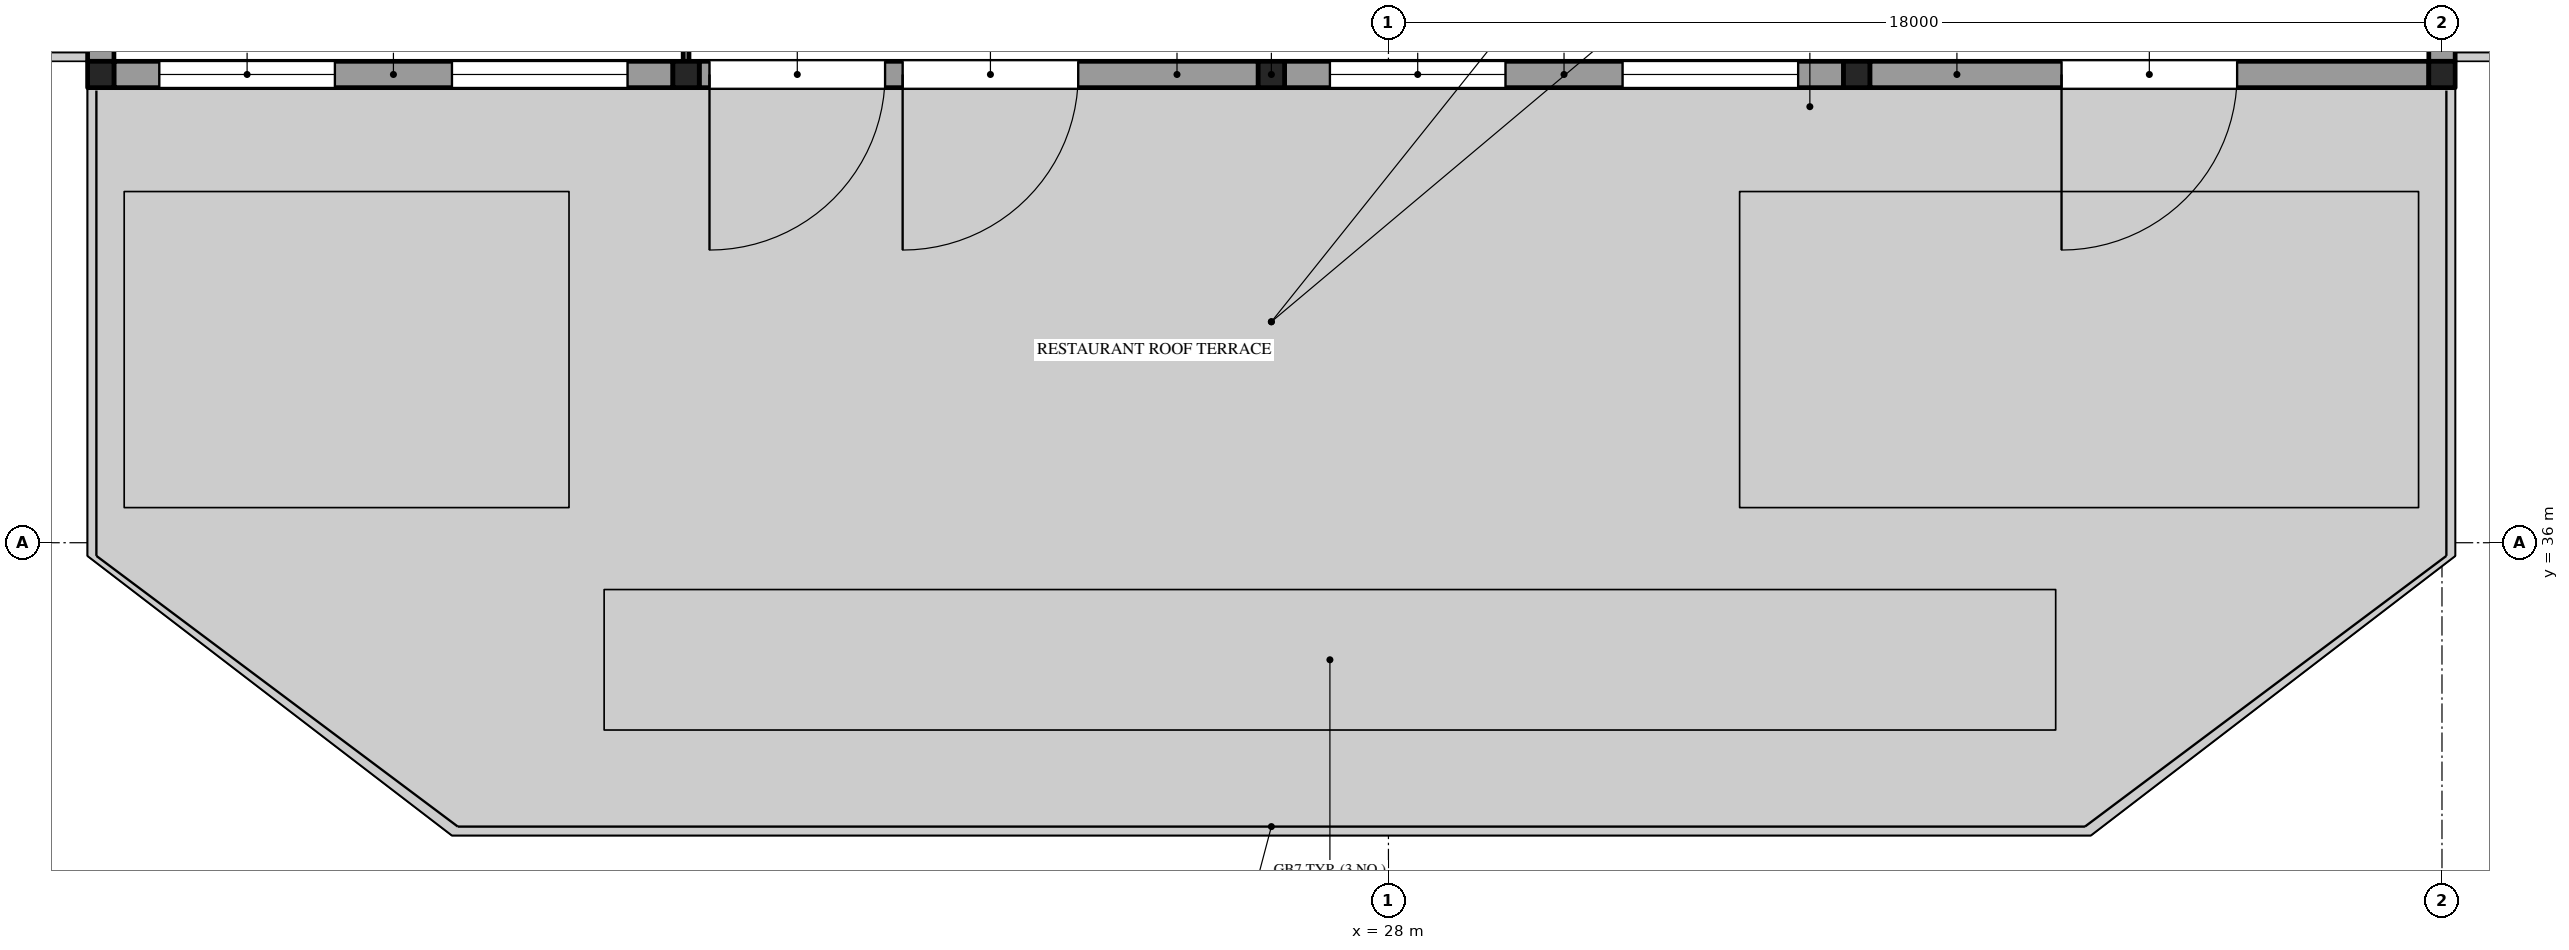
"""IFC4 building model, lengths in metres.
Left out: names, types, materials, properties, quantities, classifications, styles, units other than length and angle.
Written with IfcOpenShell. Run it as: python <this file> out.ifc"""

import sys

from ifc_helpers import new_model, si_unit, direction, frame, frame_2d, origin, origin_2d, place, context, subcontext, project, spatial, rectangle, extrude, element, fill, save


model = new_model("IFC4")
c1 = context("Model", 3, precision=1e-05, world=origin(), true_north=direction((0.0, 1.0)))
c2 = subcontext(c1, "Body", "Model", "MODEL_VIEW")
j1 = project(units=[si_unit("LENGTHUNIT", "METRE"), si_unit("PLANEANGLEUNIT", "RADIAN")], contexts=[c1])
p1 = place(None, origin())
s1 = spatial("IfcSite", under=j1, at=p1, CompositionType="ELEMENT")
p2 = place(p1, origin())
s2 = spatial("IfcBuilding", under=s1, at=p2, CompositionType="ELEMENT")
p3 = place(p2, frame((0.0, 0.0, 12.0)))
s3 = spatial("IfcBuildingStorey", under=s2, at=p3, CompositionType="ELEMENT", Elevation=12.0)
for number, where, z_axis, x_axis in (
    (1, (6.0, 44.0, 0.0), (0.0, 0.0, 1.0), (1.0, 0.0, 0.0)),
    (2, (16.0, 44.0, 0.0), (0.0, 0.0, 1.0), (1.0, 0.0, 0.0)),
    (3, (26.0, 44.0, 0.0), (0.0, 0.0, 1.0), (1.0, 0.0, 0.0)),
    (4, (36.0, 44.0, 0.0), (0.0, 0.0, 1.0), (1.0, 0.0, 0.0)),
    (5, (46.0, 44.0, 0.0), (0.0, 0.0, 1.0), (1.0, 0.0, 0.0)),
):
    element("IfcColumn", number, at=place(p3, frame(where, z_axis=z_axis, x_axis=x_axis)), inside=s3, PredefinedType="COLUMN", context=c2, shape_type="SweptSolid", body=[
        extrude(rectangle(XDim=0.45, YDim=0.45, at=origin_2d()), origin(), (0.0, 0.0, 1.0), 4.8),
    ])
p4 = place(p3, frame((6.225, 44.0, 0.0), z_axis=(0.0, 0.0, 1.0), x_axis=(1.0, 0.0, 0.0)))
e6 = element("IfcWall", 6, at=p4, inside=s3, PredefinedType="SOLIDWALL", context=c2, shape_type="SweptSolid", body=[
    extrude(rectangle(XDim=9.55, YDim=0.45, at=frame_2d((4.775, 0.0))), origin(), (0.0, 0.0, 1.0), 4.45),
])
p5 = place(p4, frame((0.775, 0.0, 0.6)))
e7 = element("IfcOpeningElement", 7, at=p5, cuts=e6, PredefinedType="OPENING", context=c2, shape_type="SweptSolid", body=[
    extrude(rectangle(XDim=3.0, YDim=3.2, at=frame_2d((1.5, 1.6))), frame((0.0, 0.235, 0.0), z_axis=(0.0, -1.0, 0.0), x_axis=(1.0, 0.0, 0.0)), (0.0, 0.0, 1.0), 0.47),
])
p6 = place(p4, frame((5.775, 0.0, 0.6)))
e8 = element("IfcOpeningElement", 8, at=p6, cuts=e6, PredefinedType="OPENING", context=c2, shape_type="SweptSolid", body=[
    extrude(rectangle(XDim=3.0, YDim=3.2, at=frame_2d((1.5, 1.6))), frame((0.0, 0.235, 0.0), z_axis=(0.0, -1.0, 0.0), x_axis=(1.0, 0.0, 0.0)), (0.0, 0.0, 1.0), 0.47),
])
p7 = place(p3, frame((16.225, 44.0, 0.0), z_axis=(0.0, 0.0, 1.0), x_axis=(1.0, 0.0, 0.0)))
e9 = element("IfcWall", 9, at=p7, inside=s3, PredefinedType="SOLIDWALL", context=c2, shape_type="SweptSolid", body=[
    extrude(rectangle(XDim=9.55, YDim=0.45, at=frame_2d((4.775, 0.0))), origin(), (0.0, 0.0, 1.0), 4.45),
])
p8 = place(p7, frame((0.175, 0.0, 0.0)))
e10 = element("IfcOpeningElement", 10, at=p8, cuts=e9, PredefinedType="OPENING", context=c2, shape_type="SweptSolid", body=[
    extrude(rectangle(XDim=3.0, YDim=2.4, at=frame_2d((1.5, 1.2))), frame((0.0, 0.235, 0.0), z_axis=(0.0, -1.0, 0.0), x_axis=(1.0, 0.0, 0.0)), (0.0, 0.0, 1.0), 0.47),
])
p9 = place(p7, frame((3.475, 0.0, 0.0)))
e11 = element("IfcOpeningElement", 11, at=p9, cuts=e9, PredefinedType="OPENING", context=c2, shape_type="SweptSolid", body=[
    extrude(rectangle(XDim=3.0, YDim=2.4, at=frame_2d((1.5, 1.2))), frame((0.0, 0.235, 0.0), z_axis=(0.0, -1.0, 0.0), x_axis=(1.0, 0.0, 0.0)), (0.0, 0.0, 1.0), 0.47),
])
p10 = place(p3, frame((26.225, 44.0, 0.0), z_axis=(0.0, 0.0, 1.0), x_axis=(1.0, 0.0, 0.0)))
e12 = element("IfcWall", 12, at=p10, inside=s3, PredefinedType="SOLIDWALL", context=c2, shape_type="SweptSolid", body=[
    extrude(rectangle(XDim=9.55, YDim=0.45, at=frame_2d((4.775, 0.0))), origin(), (0.0, 0.0, 1.0), 4.45),
])
p11 = place(p10, frame((0.775, 0.0, 0.6)))
e13 = element("IfcOpeningElement", 13, at=p11, cuts=e12, PredefinedType="OPENING", context=c2, shape_type="SweptSolid", body=[
    extrude(rectangle(XDim=3.0, YDim=3.2, at=frame_2d((1.5, 1.6))), frame((0.0, 0.235, 0.0), z_axis=(0.0, -1.0, 0.0), x_axis=(1.0, 0.0, 0.0)), (0.0, 0.0, 1.0), 0.47),
])
p12 = place(p10, frame((5.775, 0.0, 0.6)))
e14 = element("IfcOpeningElement", 14, at=p12, cuts=e12, PredefinedType="OPENING", context=c2, shape_type="SweptSolid", body=[
    extrude(rectangle(XDim=3.0, YDim=3.2, at=frame_2d((1.5, 1.6))), frame((0.0, 0.235, 0.0), z_axis=(0.0, -1.0, 0.0), x_axis=(1.0, 0.0, 0.0)), (0.0, 0.0, 1.0), 0.47),
])
p13 = place(p3, frame((36.225, 44.0, 0.0), z_axis=(0.0, 0.0, 1.0), x_axis=(1.0, 0.0, 0.0)))
e15 = element("IfcWall", 15, at=p13, inside=s3, PredefinedType="SOLIDWALL", context=c2, shape_type="SweptSolid", body=[
    extrude(rectangle(XDim=9.55, YDim=0.45, at=frame_2d((4.775, 0.0))), origin(), (0.0, 0.0, 1.0), 4.45),
])
p14 = place(p13, frame((3.275, 0.0, 0.0)))
e16 = element("IfcOpeningElement", 16, at=p14, cuts=e15, PredefinedType="OPENING", context=c2, shape_type="SweptSolid", body=[
    extrude(rectangle(XDim=3.0, YDim=2.4, at=frame_2d((1.5, 1.2))), frame((0.0, 0.235, 0.0), z_axis=(0.0, -1.0, 0.0), x_axis=(1.0, 0.0, 0.0)), (0.0, 0.0, 1.0), 0.47),
])
p15 = place(p3, frame((6.0, 51.775, 0.0), z_axis=(0.0, 0.0, 1.0), x_axis=(0.0, -1.0, 0.0)))
e17 = element("IfcWall", 17, at=p15, inside=s3, PredefinedType="SOLIDWALL", context=c2, shape_type="SweptSolid", body=[
    extrude(rectangle(XDim=7.55, YDim=0.45, at=frame_2d((3.775, 0.0))), origin(), (0.0, 0.0, 1.0), 4.45),
])
p16 = place(p15, frame((4.275, 0.0, 0.6)))
e18 = element("IfcOpeningElement", 18, at=p16, cuts=e17, PredefinedType="OPENING", context=c2, shape_type="SweptSolid", body=[
    extrude(rectangle(XDim=3.0, YDim=3.2, at=frame_2d((1.5, 1.6))), frame((0.0, 0.235, 0.0), z_axis=(0.0, -1.0, 0.0), x_axis=(1.0, 0.0, 0.0)), (0.0, 0.0, 1.0), 0.47),
])
p17 = place(p15, frame((0.275, 0.0, 0.6)))
e19 = element("IfcOpeningElement", 19, at=p17, cuts=e17, PredefinedType="OPENING", context=c2, shape_type="SweptSolid", body=[
    extrude(rectangle(XDim=3.0, YDim=3.2, at=frame_2d((1.5, 1.6))), frame((0.0, 0.235, 0.0), z_axis=(0.0, -1.0, 0.0), x_axis=(1.0, 0.0, 0.0)), (0.0, 0.0, 1.0), 0.47),
])
p18 = place(p3, frame((16.0, 44.225, 0.0), z_axis=(0.0, 0.0, 1.0), x_axis=(0.0, 1.0, 0.0)))
e20 = element("IfcWall", 20, at=p18, inside=s3, PredefinedType="PARTITIONING", context=c2, shape_type="SweptSolid", body=[
    extrude(rectangle(XDim=7.525, YDim=0.1, at=frame_2d((3.762, 0.0))), origin(), (0.0, 0.0, 1.0), 4.45),
])
p19 = place(p18, frame((3.175, 0.0, 0.0)))
e21 = element("IfcOpeningElement", 21, at=p19, cuts=e20, PredefinedType="OPENING", context=c2, shape_type="SweptSolid", body=[
    extrude(rectangle(XDim=1.2, YDim=2.1, at=frame_2d((0.6, 1.05))), frame((0.0, 0.06, 0.0), z_axis=(0.0, -1.0, 0.0), x_axis=(1.0, 0.0, 0.0)), (0.0, 0.0, 1.0), 0.12),
])
p20 = place(p3, frame((46.0, 44.225, 0.0), z_axis=(0.0, 0.0, 1.0), x_axis=(0.0, 1.0, 0.0)))
e22 = element("IfcWall", 22, at=p20, inside=s3, PredefinedType="SOLIDWALL", context=c2, shape_type="SweptSolid", body=[
    extrude(rectangle(XDim=7.55, YDim=0.45, at=frame_2d((3.775, 0.0))), origin(), (0.0, 0.0, 1.0), 4.45),
])
p21 = place(p20, frame((0.275, 0.0, 0.6)))
e23 = element("IfcOpeningElement", 23, at=p21, cuts=e22, PredefinedType="OPENING", context=c2, shape_type="SweptSolid", body=[
    extrude(rectangle(XDim=3.0, YDim=3.2, at=frame_2d((1.5, 1.6))), frame((0.0, 0.235, 0.0), z_axis=(0.0, -1.0, 0.0), x_axis=(1.0, 0.0, 0.0)), (0.0, 0.0, 1.0), 0.47),
])
p22 = place(p20, frame((4.275, 0.0, 0.6)))
e24 = element("IfcOpeningElement", 24, at=p22, cuts=e22, PredefinedType="OPENING", context=c2, shape_type="SweptSolid", body=[
    extrude(rectangle(XDim=3.0, YDim=3.2, at=frame_2d((1.5, 1.6))), frame((0.0, 0.235, 0.0), z_axis=(0.0, -1.0, 0.0), x_axis=(1.0, 0.0, 0.0)), (0.0, 0.0, 1.0), 0.47),
])
p23 = place(p8, frame((3.0, 0.0, 0.0), z_axis=(0.0, 0.0, 1.0), x_axis=(-1.0, 0.0, 0.0)))
e25 = element("IfcDoor", 25, at=p23, inside=s3, OperationType="DOUBLE_DOOR_SINGLE_SWING", PredefinedType="DOOR", context=c2, shape_type="SweptSolid", body=[
    extrude(rectangle(XDim=3.0, YDim=2.4, at=frame_2d((1.5, 1.2))), frame((0.0, 0.025, 0.0), z_axis=(0.0, -1.0, 0.0), x_axis=(1.0, 0.0, 0.0)), (0.0, 0.0, 1.0), 0.05),
])
fill(e10, e25)
p24 = place(p9, frame((3.0, 0.0, 0.0), z_axis=(0.0, 0.0, 1.0), x_axis=(-1.0, 0.0, 0.0)))
e26 = element("IfcDoor", 26, at=p24, inside=s3, OperationType="DOUBLE_DOOR_SINGLE_SWING", PredefinedType="DOOR", context=c2, shape_type="SweptSolid", body=[
    extrude(rectangle(XDim=3.0, YDim=2.4, at=frame_2d((1.5, 1.2))), frame((0.0, 0.025, 0.0), z_axis=(0.0, -1.0, 0.0), x_axis=(1.0, 0.0, 0.0)), (0.0, 0.0, 1.0), 0.05),
])
fill(e11, e26)
p25 = place(p14, frame((3.0, 0.0, 0.0), z_axis=(0.0, 0.0, 1.0), x_axis=(-1.0, 0.0, 0.0)))
e27 = element("IfcDoor", 27, at=p25, inside=s3, OperationType="DOUBLE_DOOR_SINGLE_SWING", PredefinedType="DOOR", context=c2, shape_type="SweptSolid", body=[
    extrude(rectangle(XDim=3.0, YDim=2.4, at=frame_2d((1.5, 1.2))), frame((0.0, 0.025, 0.0), z_axis=(0.0, -1.0, 0.0), x_axis=(1.0, 0.0, 0.0)), (0.0, 0.0, 1.0), 0.05),
])
fill(e16, e27)
p26 = place(p5, origin())
e28 = element("IfcWindow", 28, at=p26, inside=s3, PartitioningType="SINGLE_PANEL", PredefinedType="WINDOW", context=c2, shape_type="SweptSolid", body=[
    extrude(rectangle(XDim=3.0, YDim=3.2, at=frame_2d((1.5, 1.6))), frame((0.0, 0.215, 0.0), z_axis=(0.0, -1.0, 0.0), x_axis=(1.0, 0.0, 0.0)), (0.0, 0.0, 1.0), 0.06),
])
fill(e7, e28)
p27 = place(p6, origin())
e29 = element("IfcWindow", 29, at=p27, inside=s3, PartitioningType="SINGLE_PANEL", PredefinedType="WINDOW", context=c2, shape_type="SweptSolid", body=[
    extrude(rectangle(XDim=3.0, YDim=3.2, at=frame_2d((1.5, 1.6))), frame((0.0, 0.215, 0.0), z_axis=(0.0, -1.0, 0.0), x_axis=(1.0, 0.0, 0.0)), (0.0, 0.0, 1.0), 0.06),
])
fill(e8, e29)
p28 = place(p11, origin())
e30 = element("IfcWindow", 30, at=p28, inside=s3, PartitioningType="SINGLE_PANEL", PredefinedType="WINDOW", context=c2, shape_type="SweptSolid", body=[
    extrude(rectangle(XDim=3.0, YDim=3.2, at=frame_2d((1.5, 1.6))), frame((0.0, 0.215, 0.0), z_axis=(0.0, -1.0, 0.0), x_axis=(1.0, 0.0, 0.0)), (0.0, 0.0, 1.0), 0.06),
])
fill(e13, e30)
p29 = place(p12, origin())
e31 = element("IfcWindow", 31, at=p29, inside=s3, PartitioningType="SINGLE_PANEL", PredefinedType="WINDOW", context=c2, shape_type="SweptSolid", body=[
    extrude(rectangle(XDim=3.0, YDim=3.2, at=frame_2d((1.5, 1.6))), frame((0.0, 0.215, 0.0), z_axis=(0.0, -1.0, 0.0), x_axis=(1.0, 0.0, 0.0)), (0.0, 0.0, 1.0), 0.06),
])
fill(e14, e31)
save(model, sys.argv[1])
